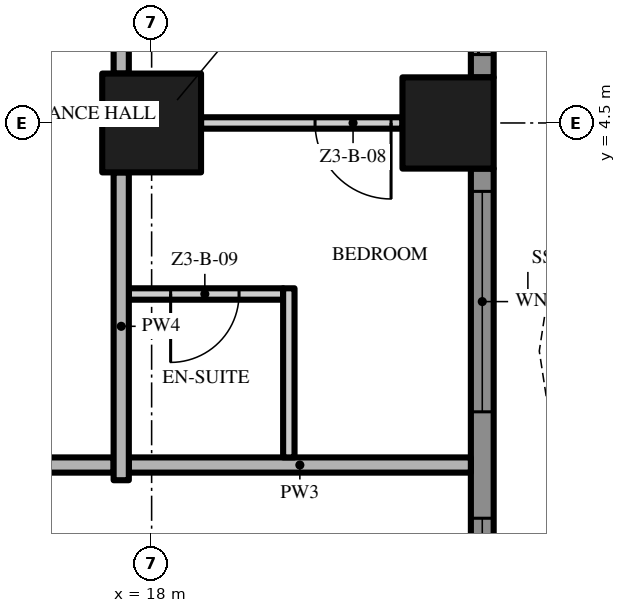
"""IFC4 building model, lengths in metres.
Left out: names, types, materials, properties, quantities, classifications, styles, units other than length and angle.
Written with IfcOpenShell. Run it as: python <this file> out.ifc"""

import sys

from ifc_helpers import new_model, si_unit, direction, frame, frame_2d, origin, origin_2d, place, context, subcontext, project, spatial, polyline, rectangle, outline, extrude, element, fill, save


model = new_model("IFC4")
c1 = context("Model", 3, precision=1e-05, world=origin(), true_north=direction((0.0, 1.0)))
c2 = subcontext(c1, "Body", "Model", "MODEL_VIEW")
j1 = project(units=[si_unit("LENGTHUNIT", "METRE"), si_unit("PLANEANGLEUNIT", "RADIAN")], contexts=[c1])
p1 = place(None, origin())
s1 = spatial("IfcSite", under=j1, at=p1, CompositionType="ELEMENT")
p2 = place(p1, origin())
s2 = spatial("IfcBuilding", under=s1, at=p2, CompositionType="ELEMENT")
p3 = place(p2, frame((0.0, 0.0, 136.4)))
s3 = spatial("IfcBuildingStorey", under=s2, at=p3, CompositionType="ELEMENT", Elevation=136.4)
p4 = place(p3, frame((18.0, 4.5, 0.0), z_axis=(0.0, 0.0, 1.0), x_axis=(1.0, 0.0, 0.0)))
e1 = element("IfcColumn", 1, at=p4, inside=s3, PredefinedType="COLUMN", context=c2, shape_type="SweptSolid", body=[
    extrude(rectangle(XDim=1.3, YDim=1.3, at=origin_2d()), origin(), (0.0, 0.0, 1.0), 3.5),
])
p5 = place(p3, frame((21.9, 4.5, 0.0), z_axis=(0.0, 0.0, 1.0), x_axis=(1.0, 0.0, 0.0)))
e2 = element("IfcColumn", 2, at=p5, inside=s3, PredefinedType="COLUMN", context=c2, shape_type="SweptSolid", body=[
    extrude(rectangle(XDim=1.2, YDim=1.2, at=origin_2d()), origin(), (0.0, 0.0, 1.0), 3.5),
])
p6 = place(p3, frame((22.35, 3.9, 0.0), z_axis=(0.0, 0.0, 1.0), x_axis=(0.0, -1.0, 0.0)))
e3 = element("IfcWall", 3, at=p6, inside=s3, PredefinedType="SOLIDWALL", context=c2, shape_type="SweptSolid", body=[
    extrude(rectangle(XDim=7.8, YDim=0.3, at=frame_2d((3.9, 0.0))), origin(), (0.0, 0.0, 1.0), 3.5),
])
p7 = place(p6, frame((4.6, 0.0, 0.45)))
e4 = element("IfcOpeningElement", 4, at=p7, cuts=e3, PredefinedType="OPENING", context=c2, shape_type="SweptSolid", body=[
    extrude(rectangle(XDim=2.9, YDim=2.65, at=frame_2d((1.45, 1.325))), frame((0.0, 0.16, 0.0), z_axis=(0.0, -1.0, 0.0), x_axis=(1.0, 0.0, 0.0)), (0.0, 0.0, 1.0), 0.32),
])
p8 = place(p6, frame((0.3, 0.0, 0.45)))
e5 = element("IfcOpeningElement", 5, at=p8, cuts=e3, PredefinedType="OPENING", context=c2, shape_type="SweptSolid", body=[
    extrude(rectangle(XDim=2.9, YDim=2.65, at=frame_2d((1.45, 1.325))), frame((0.0, 0.16, 0.0), z_axis=(0.0, -1.0, 0.0), x_axis=(1.0, 0.0, 0.0)), (0.0, 0.0, 1.0), 0.32),
])
p9 = place(p3, frame((22.35, 12.9, 0.0), z_axis=(0.0, 0.0, 1.0), x_axis=(0.0, -1.0, 0.0)))
e6 = element("IfcWall", 6, at=p9, inside=s3, PredefinedType="SOLIDWALL", context=c2, shape_type="SweptSolid", body=[
    extrude(rectangle(XDim=7.8, YDim=0.3, at=frame_2d((3.9, 0.0))), origin(), (0.0, 0.0, 1.0), 3.5),
])
p10 = place(p9, frame((4.6, 0.0, 0.0)))
e7 = element("IfcOpeningElement", 7, at=p10, cuts=e6, PredefinedType="OPENING", context=c2, shape_type="SweptSolid", body=[
    extrude(rectangle(XDim=2.9, YDim=2.4, at=frame_2d((1.45, 1.2))), frame((0.0, 0.16, 0.0), z_axis=(0.0, -1.0, 0.0), x_axis=(1.0, 0.0, 0.0)), (0.0, 0.0, 1.0), 0.32),
])
p11 = place(p9, frame((0.3, 0.0, 0.0)))
e8 = element("IfcOpeningElement", 8, at=p11, cuts=e6, PredefinedType="OPENING", context=c2, shape_type="SweptSolid", body=[
    extrude(rectangle(XDim=2.9, YDim=2.4, at=frame_2d((1.45, 1.2))), frame((0.0, 0.16, 0.0), z_axis=(0.0, -1.0, 0.0), x_axis=(1.0, 0.0, 0.0)), (0.0, 0.0, 1.0), 0.32),
])
p12 = place(p3, origin())
e9 = element("IfcWall", 9, at=p12, inside=s3, PredefinedType="USERDEFINED", context=c2, shape_type="SweptSolid", body=[
    extrude(outline(polyline([(23.1, -13.5), (23.329, -12.0), (23.929, -10.5), (24.671, -9.0), (25.271, -7.5), (25.5, -6.0), (25.271, -4.5), (24.671, -3.0), (23.929, -1.5), (23.329, 0.0), (23.1, 1.5), (23.329, 3.0), (23.929, 4.5), (24.671, 6.0), (25.271, 7.5), (25.5, 9.0), (25.271, 10.5), (24.671, 12.0), (23.929, 13.5), (23.329, 15.0), (23.1, 16.5), (23.329, 18.0), (23.082, 18.038), (22.847, 16.5), (23.086, 14.934), (23.701, 13.398), (24.442, 11.898), (25.028, 10.434), (25.247, 9.0), (25.028, 7.566), (24.442, 6.102), (23.701, 4.602), (23.086, 3.066), (22.847, 1.5), (23.086, -0.066), (23.701, -1.602), (24.442, -3.102), (25.028, -4.566), (25.247, -6.0), (25.028, -7.434), (24.442, -8.898), (23.701, -10.398), (23.086, -11.934), (22.853, -13.462), (23.1, -13.5)])), origin(), (0.0, 0.0, 1.0), 0.9),
])
p13 = place(p3, frame((17.5, 0.0, 0.0), z_axis=(0.0, 0.0, 1.0), x_axis=(-1.0, 0.0, 0.0)))
e10 = element("IfcWall", 10, at=p13, inside=s3, PredefinedType="PARTITIONING", context=c2, shape_type="SweptSolid", body=[
    extrude(rectangle(XDim=35.0, YDim=0.2, at=frame_2d((17.5, 0.0))), origin(), (0.0, 0.0, 1.0), 3.5),
])
p14 = place(p13, frame((28.0, 0.0, 0.0)))
e11 = element("IfcOpeningElement", 11, at=p14, cuts=e10, PredefinedType="OPENING", context=c2, shape_type="SweptSolid", body=[
    extrude(rectangle(XDim=1.5, YDim=2.4, at=frame_2d((0.75, 1.2))), frame((0.0, 0.11, 0.0), z_axis=(0.0, -1.0, 0.0), x_axis=(1.0, 0.0, 0.0)), (0.0, 0.0, 1.0), 0.22),
])
p15 = place(p13, frame((10.0, 0.0, 0.0)))
e12 = element("IfcOpeningElement", 12, at=p15, cuts=e10, PredefinedType="OPENING", context=c2, shape_type="SweptSolid", body=[
    extrude(rectangle(XDim=1.5, YDim=2.4, at=frame_2d((0.75, 1.2))), frame((0.0, 0.11, 0.0), z_axis=(0.0, -1.0, 0.0), x_axis=(1.0, 0.0, 0.0)), (0.0, 0.0, 1.0), 0.22),
])
p16 = place(p3, frame((17.7, 0.0, 0.0), z_axis=(0.0, 0.0, 1.0), x_axis=(1.0, 0.0, 0.0)))
e13 = element("IfcWall", 13, at=p16, inside=s3, PredefinedType="PARTITIONING", context=c2, shape_type="SweptSolid", body=[
    extrude(rectangle(XDim=4.5, YDim=0.2, at=frame_2d((2.25, 0.0))), origin(), (0.0, 0.0, 1.0), 3.5),
])
p17 = place(p3, frame((19.73, 2.25, 0.0), z_axis=(0.0, 0.0, 1.0), x_axis=(-1.0, 0.0, 0.0)))
e14 = element("IfcWall", 14, at=p17, inside=s3, PredefinedType="PARTITIONING", context=c2, shape_type="SweptSolid", body=[
    extrude(rectangle(XDim=2.03, YDim=0.15, at=frame_2d((1.015, 0.0))), origin(), (0.0, 0.0, 1.0), 3.5),
])
p18 = place(p17, frame((0.58, 0.0, 0.0)))
e15 = element("IfcOpeningElement", 15, at=p18, cuts=e14, PredefinedType="OPENING", context=c2, shape_type="SweptSolid", body=[
    extrude(rectangle(XDim=0.9, YDim=2.1, at=frame_2d((0.45, 1.05))), frame((0.0, 0.085, 0.0), z_axis=(0.0, -1.0, 0.0), x_axis=(1.0, 0.0, 0.0)), (0.0, 0.0, 1.0), 0.17),
])
p19 = place(p3, frame((21.3, 4.5, 0.0), z_axis=(0.0, 0.0, 1.0), x_axis=(-1.0, 0.0, 0.0)))
e16 = element("IfcWall", 16, at=p19, inside=s3, PredefinedType="PARTITIONING", context=c2, shape_type="SweptSolid", body=[
    extrude(rectangle(XDim=2.65, YDim=0.15, at=frame_2d((1.325, 0.0))), origin(), (0.0, 0.0, 1.0), 3.5),
])
p20 = place(p19, frame((0.15, 0.0, 0.0)))
e17 = element("IfcOpeningElement", 17, at=p20, cuts=e16, PredefinedType="OPENING", context=c2, shape_type="SweptSolid", body=[
    extrude(rectangle(XDim=1.0, YDim=2.4, at=frame_2d((0.5, 1.2))), frame((0.0, 0.085, 0.0), z_axis=(0.0, -1.0, 0.0), x_axis=(1.0, 0.0, 0.0)), (0.0, 0.0, 1.0), 0.17),
])
p21 = place(p3, frame((17.6, -0.2, 0.0), z_axis=(0.0, 0.0, 1.0), x_axis=(0.0, 1.0, 0.0)))
e18 = element("IfcWall", 18, at=p21, inside=s3, PredefinedType="PARTITIONING", context=c2, shape_type="SweptSolid", body=[
    extrude(rectangle(XDim=4.05, YDim=0.2, at=frame_2d((2.025, 0.0))), origin(), (0.0, 0.0, 1.0), 3.5),
])
p22 = place(p3, frame((17.6, 12.85, 0.0), z_axis=(0.0, 0.0, 1.0), x_axis=(0.0, -1.0, 0.0)))
e19 = element("IfcWall", 19, at=p22, inside=s3, PredefinedType="PARTITIONING", context=c2, shape_type="SweptSolid", body=[
    extrude(rectangle(XDim=7.7, YDim=0.2, at=frame_2d((3.85, 0.0))), origin(), (0.0, 0.0, 1.0), 3.5),
])
p23 = place(p22, frame((5.5, 0.0, 0.0)))
e20 = element("IfcOpeningElement", 20, at=p23, cuts=e19, PredefinedType="OPENING", context=c2, shape_type="SweptSolid", body=[
    extrude(rectangle(XDim=1.2, YDim=2.4, at=frame_2d((0.6, 1.2))), frame((0.0, 0.11, 0.0), z_axis=(0.0, -1.0, 0.0), x_axis=(1.0, 0.0, 0.0)), (0.0, 0.0, 1.0), 0.22),
])
p24 = place(p3, frame((19.805, 0.1, 0.0), z_axis=(0.0, 0.0, 1.0), x_axis=(0.0, 1.0, 0.0)))
e21 = element("IfcWall", 21, at=p24, inside=s3, PredefinedType="PARTITIONING", context=c2, shape_type="SweptSolid", body=[
    extrude(rectangle(XDim=2.225, YDim=0.15, at=frame_2d((1.113, 0.0))), origin(), (0.0, 0.0, 1.0), 3.5),
])
p25 = place(p7, origin())
e22 = element("IfcWindow", 22, at=p25, inside=s3, PartitioningType="SINGLE_PANEL", PredefinedType="WINDOW", context=c2, shape_type="SweptSolid", body=[
    extrude(rectangle(XDim=2.9, YDim=2.65, at=frame_2d((1.45, 1.325))), frame((0.0, 0.03, 0.0), z_axis=(0.0, -1.0, 0.0), x_axis=(1.0, 0.0, 0.0)), (0.0, 0.0, 1.0), 0.06),
])
fill(e4, e22)
p26 = place(p8, origin())
e23 = element("IfcWindow", 23, at=p26, inside=s3, PartitioningType="SINGLE_PANEL", PredefinedType="WINDOW", context=c2, shape_type="SweptSolid", body=[
    extrude(rectangle(XDim=2.9, YDim=2.65, at=frame_2d((1.45, 1.325))), frame((0.0, 0.03, 0.0), z_axis=(0.0, -1.0, 0.0), x_axis=(1.0, 0.0, 0.0)), (0.0, 0.0, 1.0), 0.06),
])
fill(e5, e23)
p27 = place(p10, origin())
e24 = element("IfcDoor", 24, at=p27, inside=s3, OperationType="SINGLE_SWING_LEFT", PredefinedType="DOOR", context=c2, shape_type="SweptSolid", body=[
    extrude(rectangle(XDim=2.9, YDim=2.4, at=frame_2d((1.45, 1.2))), frame((0.0, 0.025, 0.0), z_axis=(0.0, -1.0, 0.0), x_axis=(1.0, 0.0, 0.0)), (0.0, 0.0, 1.0), 0.05),
])
fill(e7, e24)
p28 = place(p20, origin())
e25 = element("IfcDoor", 25, at=p28, inside=s3, OperationType="SINGLE_SWING_LEFT", PredefinedType="DOOR", context=c2, shape_type="SweptSolid", body=[
    extrude(rectangle(XDim=1.0, YDim=2.4, at=frame_2d((0.5, 1.2))), frame((0.0, 0.025, 0.0), z_axis=(0.0, -1.0, 0.0), x_axis=(1.0, 0.0, 0.0)), (0.0, 0.0, 1.0), 0.05),
])
fill(e17, e25)
p29 = place(p18, origin())
e26 = element("IfcDoor", 26, at=p29, inside=s3, OperationType="SINGLE_SWING_RIGHT", PredefinedType="DOOR", context=c2, shape_type="SweptSolid", body=[
    extrude(rectangle(XDim=0.9, YDim=2.1, at=frame_2d((0.45, 1.05))), frame((0.0, 0.025, 0.0), z_axis=(0.0, -1.0, 0.0), x_axis=(1.0, 0.0, 0.0)), (0.0, 0.0, 1.0), 0.05),
])
fill(e15, e26)
save(model, sys.argv[1])
